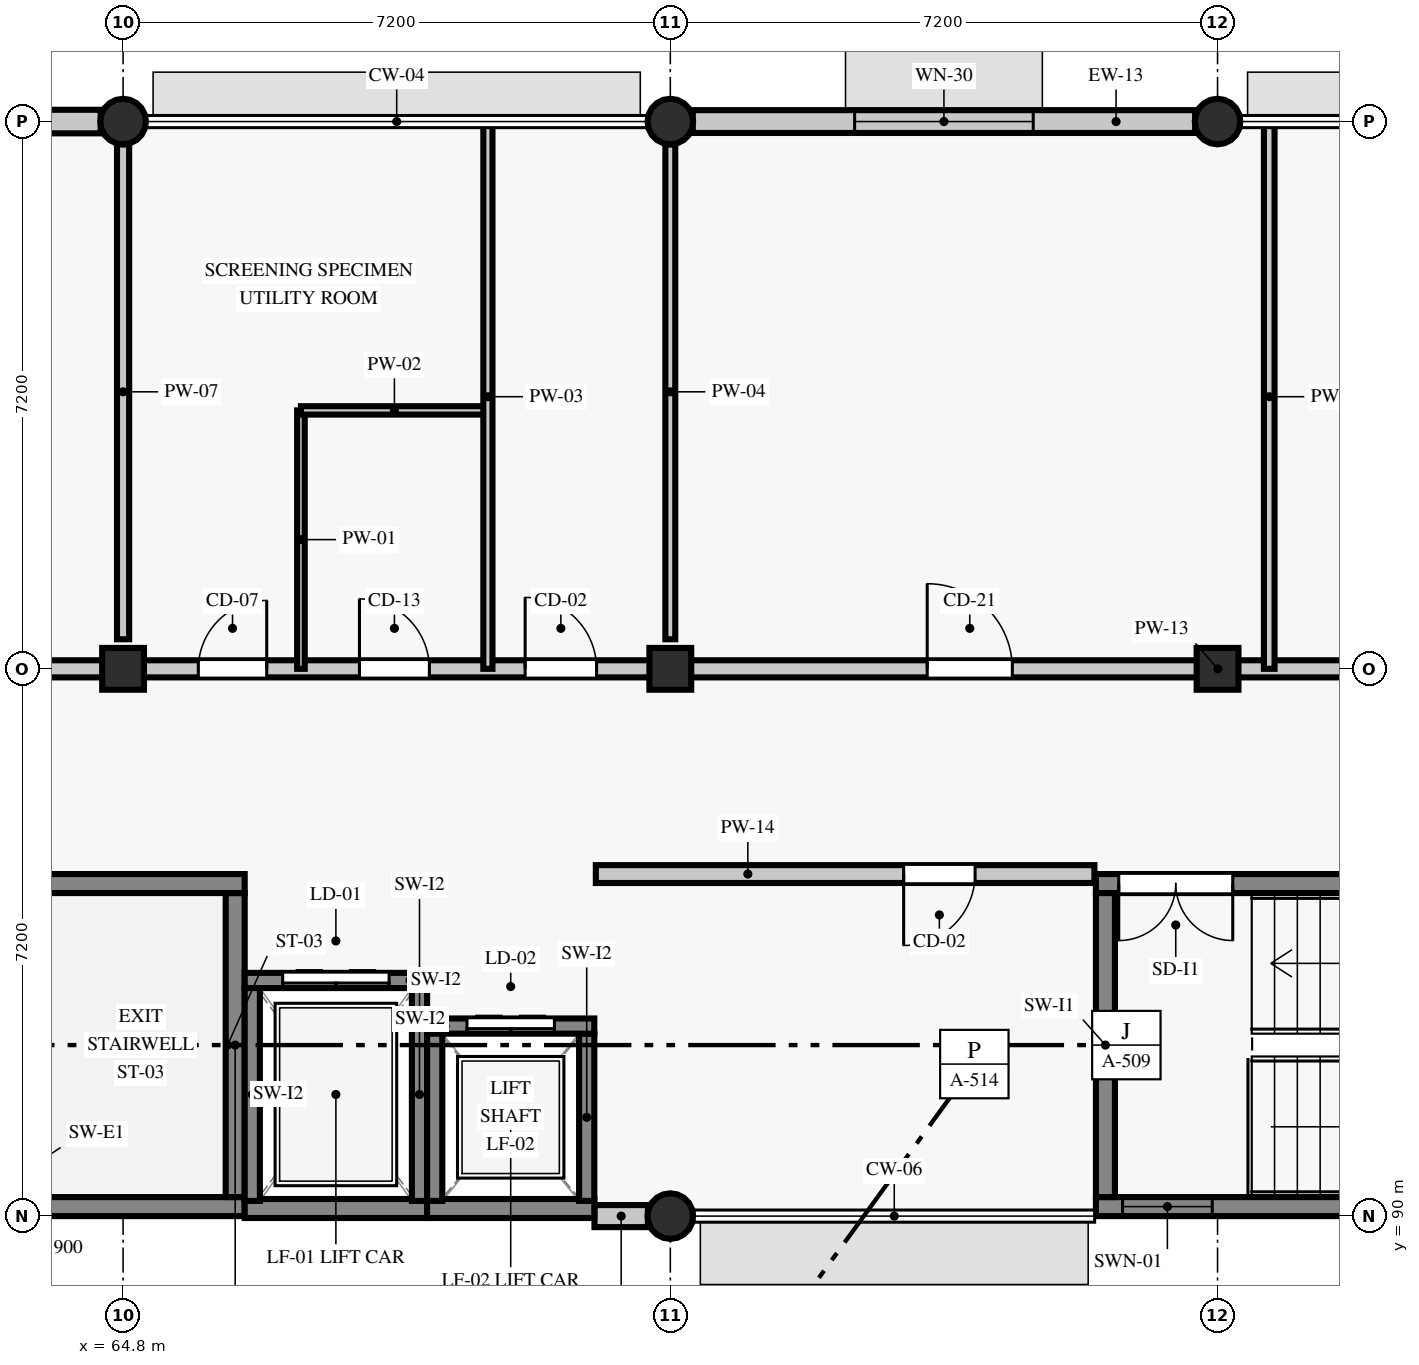
"""IFC4 building model, lengths in metres.
Left out: names, types, materials, properties, quantities, classifications, styles, units other than length and angle.
Written with IfcOpenShell. Run it as: python <this file> out.ifc"""

import sys

from ifc_helpers import new_model, si_unit, direction, frame, frame_2d, origin, origin_2d, place, context, subcontext, project, spatial, rectangle, circle, extrude, element, fill, save


model = new_model("IFC4")
c1 = context("Model", 3, precision=1e-05, world=origin(), true_north=direction((0.0, 1.0)))
c2 = subcontext(c1, "Body", "Model", "MODEL_VIEW")
j1 = project(units=[si_unit("LENGTHUNIT", "METRE"), si_unit("PLANEANGLEUNIT", "RADIAN")], contexts=[c1])
p1 = place(None, origin())
s1 = spatial("IfcSite", under=j1, at=p1, CompositionType="ELEMENT")
p2 = place(p1, origin())
s2 = spatial("IfcBuilding", under=s1, at=p2, CompositionType="ELEMENT")
p3 = place(p2, frame((0.0, 0.0, 18.0)))
s3 = spatial("IfcBuildingStorey", under=s2, at=p3, CompositionType="ELEMENT", Elevation=18.0)
p4 = place(p3, frame((64.8, 97.2, 0.0), z_axis=(0.0, 0.0, 1.0), x_axis=(1.0, 0.0, 0.0)))
e1 = element("IfcColumn", 1, at=p4, inside=s3, PredefinedType="COLUMN", context=c2, shape_type="SweptSolid", body=[
    extrude(rectangle(XDim=0.55, YDim=0.55, at=origin_2d()), origin(), (0.0, 0.0, 1.0), 3.94),
])
for number, where, z_axis, x_axis in (
    (2, (64.8, 104.4, 0.0), (0.0, 0.0, 1.0), (1.0, 0.0, 0.0)),
    (3, (72.0, 90.0, 0.0), (0.0, 0.0, 1.0), (1.0, 0.0, 0.0)),
):
    element("IfcColumn", number, at=place(p3, frame(where, z_axis=z_axis, x_axis=x_axis)), inside=s3, PredefinedType="COLUMN", context=c2, shape_type="SweptSolid", body=[
        extrude(circle(Radius=0.3, at=origin_2d()), origin(), (0.0, 0.0, 1.0), 3.94),
    ])
p5 = place(p3, frame((72.0, 97.2, 0.0), z_axis=(0.0, 0.0, 1.0), x_axis=(1.0, 0.0, 0.0)))
e4 = element("IfcColumn", 4, at=p5, inside=s3, PredefinedType="COLUMN", context=c2, shape_type="SweptSolid", body=[
    extrude(rectangle(XDim=0.55, YDim=0.55, at=origin_2d()), origin(), (0.0, 0.0, 1.0), 3.94),
])
p6 = place(p3, frame((72.0, 104.4, 0.0), z_axis=(0.0, 0.0, 1.0), x_axis=(1.0, 0.0, 0.0)))
e5 = element("IfcColumn", 5, at=p6, inside=s3, PredefinedType="COLUMN", context=c2, shape_type="SweptSolid", body=[
    extrude(circle(Radius=0.3, at=origin_2d()), origin(), (0.0, 0.0, 1.0), 3.94),
])
p7 = place(p3, frame((79.2, 97.2, 0.0), z_axis=(0.0, 0.0, 1.0), x_axis=(1.0, 0.0, 0.0)))
e6 = element("IfcColumn", 6, at=p7, inside=s3, PredefinedType="COLUMN", context=c2, shape_type="SweptSolid", body=[
    extrude(rectangle(XDim=0.55, YDim=0.55, at=origin_2d()), origin(), (0.0, 0.0, 1.0), 3.94),
])
p8 = place(p3, frame((79.2, 104.4, 0.0), z_axis=(0.0, 0.0, 1.0), x_axis=(1.0, 0.0, 0.0)))
e7 = element("IfcColumn", 7, at=p8, inside=s3, PredefinedType="COLUMN", context=c2, shape_type="SweptSolid", body=[
    extrude(circle(Radius=0.3, at=origin_2d()), origin(), (0.0, 0.0, 1.0), 3.94),
])
p9 = place(p3, frame((71.002, 90.0, 0.0), z_axis=(0.0, 0.0, 1.0), x_axis=(1.0, 0.0, 0.0)))
e8 = element("IfcWall", 8, at=p9, inside=s3, PredefinedType="STANDARD", context=c2, shape_type="SweptSolid", body=[
    extrude(rectangle(XDim=0.703, YDim=0.29, at=frame_2d((0.352, 0.0))), origin(), (0.0, 0.0, 1.0), 3.94),
])
p10 = place(p3, frame((78.905, 104.4, 0.0), z_axis=(0.0, 0.0, 1.0), x_axis=(-1.0, 0.0, 0.0)))
e9 = element("IfcWall", 9, at=p10, inside=s3, PredefinedType="STANDARD", context=c2, shape_type="SweptSolid", body=[
    extrude(rectangle(XDim=6.61, YDim=0.3, at=frame_2d((3.305, 0.0))), origin(), (0.0, 0.0, 1.0), 3.29),
])
p11 = place(p10, frame((2.13, 0.0, 0.9)))
e10 = element("IfcOpeningElement", 10, at=p11, cuts=e9, PredefinedType="OPENING", context=c2, shape_type="SweptSolid", body=[
    extrude(rectangle(XDim=2.35, YDim=1.54, at=frame_2d((1.175, 0.77))), frame((0.0, 0.16, 0.0), z_axis=(0.0, -1.0, 0.0), x_axis=(1.0, 0.0, 0.0)), (0.0, 0.0, 1.0), 0.32),
])
p12 = place(p3, frame((64.505, 104.4, 0.0), z_axis=(0.0, 0.0, 1.0), x_axis=(-1.0, 0.0, 0.0)))
e11 = element("IfcWall", 11, at=p12, inside=s3, PredefinedType="STANDARD", context=c2, shape_type="SweptSolid", body=[
    extrude(rectangle(XDim=6.61, YDim=0.31, at=frame_2d((3.305, 0.0))), origin(), (0.0, 0.0, 1.0), 3.29),
])
p13 = place(p12, frame((2.705, 0.0, 0.9)))
e12 = element("IfcOpeningElement", 12, at=p13, cuts=e11, PredefinedType="OPENING", context=c2, shape_type="SweptSolid", body=[
    extrude(rectangle(XDim=1.2, YDim=1.66, at=frame_2d((0.6, 0.83))), frame((0.0, 0.165, 0.0), z_axis=(0.0, -1.0, 0.0), x_axis=(1.0, 0.0, 0.0)), (0.0, 0.0, 1.0), 0.33),
])
p14 = place(p3, frame((57.6, 90.125, 0.0), z_axis=(0.0, 0.0, 1.0), x_axis=(1.0, 0.0, 0.0)))
e13 = element("IfcWall", 13, at=p14, inside=s3, PredefinedType="SHEAR", context=c2, shape_type="SweptSolid", body=[
    extrude(rectangle(XDim=8.8, YDim=0.25, at=frame_2d((4.4, 0.0))), origin(), (0.0, 0.0, 1.0), 3.94),
])
p15 = place(p14, frame((0.35, 0.0, 0.92)))
e14 = element("IfcOpeningElement", 14, at=p15, cuts=e13, PredefinedType="OPENING", context=c2, shape_type="SweptSolid", body=[
    extrude(rectangle(XDim=1.18, YDim=1.48, at=frame_2d((0.59, 0.74))), frame((0.0, 0.135, 0.0), z_axis=(0.0, -1.0, 0.0), x_axis=(1.0, 0.0, 0.0)), (0.0, 0.0, 1.0), 0.27),
])
p16 = place(p3, frame((66.275, 90.25, 0.0), z_axis=(0.0, 0.0, 1.0), x_axis=(0.0, 1.0, 0.0)))
e15 = element("IfcWall", 15, at=p16, inside=s3, PredefinedType="SHEAR", context=c2, shape_type="SweptSolid", body=[
    extrude(rectangle(XDim=4.0, YDim=0.25, at=frame_2d((2.0, 0.0))), origin(), (0.0, 0.0, 1.0), 3.94),
])
p17 = place(p3, frame((66.4, 94.375, 0.0), z_axis=(0.0, 0.0, 1.0), x_axis=(-1.0, 0.0, 0.0)))
e16 = element("IfcWall", 16, at=p17, inside=s3, PredefinedType="SHEAR", context=c2, shape_type="SweptSolid", body=[
    extrude(rectangle(XDim=8.8, YDim=0.25, at=frame_2d((4.4, 0.0))), origin(), (0.0, 0.0, 1.0), 3.94),
])
p18 = place(p17, frame((7.0, 0.0, 0.0)))
e17 = element("IfcOpeningElement", 17, at=p18, cuts=e16, PredefinedType="OPENING", context=c2, shape_type="SweptSolid", body=[
    extrude(rectangle(XDim=1.5, YDim=2.15, at=frame_2d((0.75, 1.075))), frame((0.0, 0.135, 0.0), z_axis=(0.0, -1.0, 0.0), x_axis=(1.0, 0.0, 0.0)), (0.0, 0.0, 1.0), 0.27),
])
p19 = place(p3, frame((77.6, 90.125, 0.0), z_axis=(0.0, 0.0, 1.0), x_axis=(1.0, 0.0, 0.0)))
e18 = element("IfcWall", 18, at=p19, inside=s3, PredefinedType="SHEAR", context=c2, shape_type="SweptSolid", body=[
    extrude(rectangle(XDim=8.8, YDim=0.25, at=frame_2d((4.4, 0.0))), origin(), (0.0, 0.0, 1.0), 3.94),
])
p20 = place(p19, frame((0.35, 0.0, 0.92)))
e19 = element("IfcOpeningElement", 19, at=p20, cuts=e18, PredefinedType="OPENING", context=c2, shape_type="SweptSolid", body=[
    extrude(rectangle(XDim=1.18, YDim=1.48, at=frame_2d((0.59, 0.74))), frame((0.0, 0.135, 0.0), z_axis=(0.0, -1.0, 0.0), x_axis=(1.0, 0.0, 0.0)), (0.0, 0.0, 1.0), 0.27),
])
p21 = place(p3, frame((86.4, 94.375, 0.0), z_axis=(0.0, 0.0, 1.0), x_axis=(-1.0, 0.0, 0.0)))
e20 = element("IfcWall", 20, at=p21, inside=s3, PredefinedType="SHEAR", context=c2, shape_type="SweptSolid", body=[
    extrude(rectangle(XDim=8.8, YDim=0.25, at=frame_2d((4.4, 0.0))), origin(), (0.0, 0.0, 1.0), 3.94),
])
p22 = place(p21, frame((7.0, 0.0, 0.0)))
e21 = element("IfcOpeningElement", 21, at=p22, cuts=e20, PredefinedType="OPENING", context=c2, shape_type="SweptSolid", body=[
    extrude(rectangle(XDim=1.5, YDim=2.15, at=frame_2d((0.75, 1.075))), frame((0.0, 0.135, 0.0), z_axis=(0.0, -1.0, 0.0), x_axis=(1.0, 0.0, 0.0)), (0.0, 0.0, 1.0), 0.27),
])
p23 = place(p3, frame((77.725, 94.25, 0.0), z_axis=(0.0, 0.0, 1.0), x_axis=(0.0, -1.0, 0.0)))
e22 = element("IfcWall", 22, at=p23, inside=s3, PredefinedType="SHEAR", context=c2, shape_type="SweptSolid", body=[
    extrude(rectangle(XDim=4.0, YDim=0.25, at=frame_2d((2.0, 0.0))), origin(), (0.0, 0.0, 1.0), 3.94),
])
p24 = place(p3, frame((66.4, 90.1, 0.0), z_axis=(0.0, 0.0, 1.0), x_axis=(1.0, 0.0, 0.0)))
e23 = element("IfcWall", 23, at=p24, inside=s3, PredefinedType="SHEAR", context=c2, shape_type="SweptSolid", body=[
    extrude(rectangle(XDim=2.4, YDim=0.25, at=frame_2d((1.2, 0.0))), origin(), (0.0, 0.0, 1.0), 3.94),
])
p25 = place(p3, frame((68.7, 90.2, 0.0), z_axis=(0.0, 0.0, 1.0), x_axis=(0.0, 1.0, 0.0)))
e24 = element("IfcWall", 24, at=p25, inside=s3, PredefinedType="SHEAR", context=c2, shape_type="SweptSolid", body=[
    extrude(rectangle(XDim=2.8, YDim=0.2, at=frame_2d((1.4, 0.0))), origin(), (0.0, 0.0, 1.0), 3.94),
])
p26 = place(p3, frame((68.8, 93.1, 0.0), z_axis=(0.0, 0.0, 1.0), x_axis=(-1.0, 0.0, 0.0)))
e25 = element("IfcWall", 25, at=p26, inside=s3, PredefinedType="SHEAR", context=c2, shape_type="SweptSolid", body=[
    extrude(rectangle(XDim=2.4, YDim=0.2, at=frame_2d((1.2, 0.0))), origin(), (0.0, 0.0, 1.0), 3.94),
])
p27 = place(p26, frame((0.5, 0.0, 0.0)))
e26 = element("IfcOpeningElement", 26, at=p27, cuts=e25, PredefinedType="OPENING", context=c2, shape_type="SweptSolid", body=[
    extrude(rectangle(XDim=1.4, YDim=2.15, at=frame_2d((0.7, 1.075))), frame((0.0, 0.11, 0.0), z_axis=(0.0, -1.0, 0.0), x_axis=(1.0, 0.0, 0.0)), (0.0, 0.0, 1.0), 0.22),
])
p28 = place(p3, frame((66.5, 93.0, 0.0), z_axis=(0.0, 0.0, 1.0), x_axis=(0.0, -1.0, 0.0)))
e27 = element("IfcWall", 27, at=p28, inside=s3, PredefinedType="SHEAR", context=c2, shape_type="SweptSolid", body=[
    extrude(rectangle(XDim=2.8, YDim=0.2, at=frame_2d((1.4, 0.0))), origin(), (0.0, 0.0, 1.0), 3.94),
])
p29 = place(p3, frame((68.8, 90.1, 0.0), z_axis=(0.0, 0.0, 1.0), x_axis=(1.0, 0.0, 0.0)))
e28 = element("IfcWall", 28, at=p29, inside=s3, PredefinedType="SHEAR", context=c2, shape_type="SweptSolid", body=[
    extrude(rectangle(XDim=2.2, YDim=0.25, at=frame_2d((1.1, 0.0))), origin(), (0.0, 0.0, 1.0), 3.94),
])
p30 = place(p3, frame((70.9, 90.2, 0.0), z_axis=(0.0, 0.0, 1.0), x_axis=(0.0, 1.0, 0.0)))
e29 = element("IfcWall", 29, at=p30, inside=s3, PredefinedType="SHEAR", context=c2, shape_type="SweptSolid", body=[
    extrude(rectangle(XDim=2.2, YDim=0.2, at=frame_2d((1.1, 0.0))), origin(), (0.0, 0.0, 1.0), 3.94),
])
p31 = place(p3, frame((71.0, 92.5, 0.0), z_axis=(0.0, 0.0, 1.0), x_axis=(-1.0, 0.0, 0.0)))
e30 = element("IfcWall", 30, at=p31, inside=s3, PredefinedType="SHEAR", context=c2, shape_type="SweptSolid", body=[
    extrude(rectangle(XDim=2.2, YDim=0.2, at=frame_2d((1.1, 0.0))), origin(), (0.0, 0.0, 1.0), 3.94),
])
p32 = place(p31, frame((0.525, 0.0, 0.0)))
e31 = element("IfcOpeningElement", 31, at=p32, cuts=e30, PredefinedType="OPENING", context=c2, shape_type="SweptSolid", body=[
    extrude(rectangle(XDim=1.15, YDim=2.15, at=frame_2d((0.575, 1.075))), frame((0.0, 0.11, 0.0), z_axis=(0.0, -1.0, 0.0), x_axis=(1.0, 0.0, 0.0)), (0.0, 0.0, 1.0), 0.22),
])
p33 = place(p3, frame((68.9, 92.4, 0.0), z_axis=(0.0, 0.0, 1.0), x_axis=(0.0, -1.0, 0.0)))
e32 = element("IfcWall", 32, at=p33, inside=s3, PredefinedType="SHEAR", context=c2, shape_type="SweptSolid", body=[
    extrude(rectangle(XDim=2.2, YDim=0.2, at=frame_2d((1.1, 0.0))), origin(), (0.0, 0.0, 1.0), 3.94),
])
p34 = place(p3, frame((57.9, 97.2, 0.0), z_axis=(0.0, 0.0, 1.0), x_axis=(1.0, 0.0, 0.0)))
e33 = element("IfcWall", 33, at=p34, inside=s3, PredefinedType="PARTITIONING", context=c2, shape_type="SweptSolid", body=[
    extrude(rectangle(XDim=28.2, YDim=0.225, at=frame_2d((14.1, 0.0))), origin(), (0.0, 0.0, 1.0), 3.19),
])
p35 = place(p34, frame((2.778, 0.0, 0.0)))
e34 = element("IfcOpeningElement", 34, at=p35, cuts=e33, PredefinedType="OPENING", context=c2, shape_type="SweptSolid", body=[
    extrude(rectangle(XDim=1.13, YDim=2.18, at=frame_2d((0.565, 1.09))), frame((0.0, 0.123, 0.0), z_axis=(0.0, -1.0, 0.0), x_axis=(1.0, 0.0, 0.0)), (0.0, 0.0, 1.0), 0.245),
])
p36 = place(p34, frame((7.89, 0.0, 0.0)))
e35 = element("IfcOpeningElement", 35, at=p36, cuts=e33, PredefinedType="OPENING", context=c2, shape_type="SweptSolid", body=[
    extrude(rectangle(XDim=0.9, YDim=2.13, at=frame_2d((0.45, 1.065))), frame((0.0, 0.123, 0.0), z_axis=(0.0, -1.0, 0.0), x_axis=(1.0, 0.0, 0.0)), (0.0, 0.0, 1.0), 0.245),
])
p37 = place(p34, frame((10.01, 0.0, 0.0)))
e36 = element("IfcOpeningElement", 36, at=p37, cuts=e33, PredefinedType="OPENING", context=c2, shape_type="SweptSolid", body=[
    extrude(rectangle(XDim=0.92, YDim=2.18, at=frame_2d((0.46, 1.09))), frame((0.0, 0.123, 0.0), z_axis=(0.0, -1.0, 0.0), x_axis=(1.0, 0.0, 0.0)), (0.0, 0.0, 1.0), 0.245),
])
p38 = place(p34, frame((12.19, 0.0, 0.0)))
e37 = element("IfcOpeningElement", 37, at=p38, cuts=e33, PredefinedType="OPENING", context=c2, shape_type="SweptSolid", body=[
    extrude(rectangle(XDim=0.94, YDim=2.08, at=frame_2d((0.47, 1.04))), frame((0.0, 0.123, 0.0), z_axis=(0.0, -1.0, 0.0), x_axis=(1.0, 0.0, 0.0)), (0.0, 0.0, 1.0), 0.245),
])
p39 = place(p34, frame((17.48, 0.0, 0.0)))
e38 = element("IfcOpeningElement", 38, at=p39, cuts=e33, PredefinedType="OPENING", context=c2, shape_type="SweptSolid", body=[
    extrude(rectangle(XDim=1.12, YDim=2.23, at=frame_2d((0.56, 1.115))), frame((0.0, 0.123, 0.0), z_axis=(0.0, -1.0, 0.0), x_axis=(1.0, 0.0, 0.0)), (0.0, 0.0, 1.0), 0.245),
])
p40 = place(p34, frame((24.009, 0.0, 0.0)))
e39 = element("IfcOpeningElement", 39, at=p40, cuts=e33, PredefinedType="OPENING", context=c2, shape_type="SweptSolid", body=[
    extrude(rectangle(XDim=1.2, YDim=2.23, at=frame_2d((0.6, 1.115))), frame((0.0, 0.123, 0.0), z_axis=(0.0, -1.0, 0.0), x_axis=(1.0, 0.0, 0.0)), (0.0, 0.0, 1.0), 0.245),
])
p41 = place(p3, frame((64.8, 97.589, 0.0), z_axis=(0.0, 0.0, 1.0), x_axis=(0.0, 1.0, 0.0)))
e40 = element("IfcWall", 40, at=p41, inside=s3, PredefinedType="PARTITIONING", context=c2, shape_type="SweptSolid", body=[
    extrude(rectangle(XDim=6.511, YDim=0.16, at=frame_2d((3.256, 0.0))), origin(), (0.0, 0.0, 1.0), 3.39),
])
p42 = place(p3, frame((67.14, 97.2, 0.0), z_axis=(0.0, 0.0, 1.0), x_axis=(0.0, 1.0, 0.0)))
e41 = element("IfcWall", 41, at=p42, inside=s3, PredefinedType="PARTITIONING", context=c2, shape_type="SweptSolid", body=[
    extrude(rectangle(XDim=3.4, YDim=0.1, at=frame_2d((1.7, 0.0))), origin(), (0.0, 0.0, 1.0), 3.19),
])
p43 = place(p3, frame((67.14, 100.6, 0.0), z_axis=(0.0, 0.0, 1.0), x_axis=(1.0, 0.0, 0.0)))
e42 = element("IfcWall", 42, at=p43, inside=s3, PredefinedType="PARTITIONING", context=c2, shape_type="SweptSolid", body=[
    extrude(rectangle(XDim=2.46, YDim=0.11, at=frame_2d((1.23, 0.0))), origin(), (0.0, 0.0, 1.0), 3.94),
])
p44 = place(p3, frame((69.6, 97.2, 0.0), z_axis=(0.0, 0.0, 1.0), x_axis=(0.0, 1.0, 0.0)))
e43 = element("IfcWall", 43, at=p44, inside=s3, PredefinedType="PARTITIONING", context=c2, shape_type="SweptSolid", body=[
    extrude(rectangle(XDim=7.16, YDim=0.12, at=frame_2d((3.58, 0.0))), origin(), (0.0, 0.0, 1.0), 3.19),
])
p45 = place(p3, frame((72.0, 97.589, 0.0), z_axis=(0.0, 0.0, 1.0), x_axis=(0.0, 1.0, 0.0)))
e44 = element("IfcWall", 44, at=p45, inside=s3, PredefinedType="PARTITIONING", context=c2, shape_type="SweptSolid", body=[
    extrude(rectangle(XDim=6.511, YDim=0.13, at=frame_2d((3.256, 0.0))), origin(), (0.0, 0.0, 1.0), 3.39),
])
p46 = place(p3, frame((79.88, 97.2, 0.0), z_axis=(0.0, 0.0, 1.0), x_axis=(0.0, 1.0, 0.0)))
e45 = element("IfcWall", 45, at=p46, inside=s3, PredefinedType="PARTITIONING", context=c2, shape_type="SweptSolid", body=[
    extrude(rectangle(XDim=7.16, YDim=0.14, at=frame_2d((3.58, 0.0))), origin(), (0.0, 0.0, 1.0), 3.19),
])
p47 = place(p3, frame((71.02, 94.5, 0.0), z_axis=(0.0, 0.0, 1.0), x_axis=(1.0, 0.0, 0.0)))
e46 = element("IfcWall", 46, at=p47, inside=s3, PredefinedType="PARTITIONING", context=c2, shape_type="SweptSolid", body=[
    extrude(rectangle(XDim=6.56, YDim=0.235, at=frame_2d((3.28, 0.0))), origin(), (0.0, 0.0, 1.0), 3.39),
])
p48 = place(p47, frame((4.05, 0.0, 0.0)))
e47 = element("IfcOpeningElement", 47, at=p48, cuts=e46, PredefinedType="OPENING", context=c2, shape_type="SweptSolid", body=[
    extrude(rectangle(XDim=0.94, YDim=2.08, at=frame_2d((0.47, 1.04))), frame((0.0, 0.127, 0.0), z_axis=(0.0, -1.0, 0.0), x_axis=(1.0, 0.0, 0.0)), (0.0, 0.0, 1.0), 0.255),
])
p49 = place(p11, origin())
e48 = element("IfcWindow", 48, at=p49, inside=s3, PartitioningType="SINGLE_PANEL", PredefinedType="WINDOW", context=c2, shape_type="SweptSolid", body=[
    extrude(rectangle(XDim=2.35, YDim=1.54, at=frame_2d((1.175, 0.77))), frame((0.0, 0.03, 0.0), z_axis=(0.0, -1.0, 0.0), x_axis=(1.0, 0.0, 0.0)), (0.0, 0.0, 1.0), 0.06),
])
fill(e10, e48)
p50 = place(p20, origin())
e49 = element("IfcWindow", 49, at=p50, inside=s3, PartitioningType="SINGLE_PANEL", PredefinedType="WINDOW", context=c2, shape_type="SweptSolid", body=[
    extrude(rectangle(XDim=1.18, YDim=1.48, at=frame_2d((0.59, 0.74))), frame((0.0, 0.03, 0.0), z_axis=(0.0, -1.0, 0.0), x_axis=(1.0, 0.0, 0.0)), (0.0, 0.0, 1.0), 0.06),
])
fill(e19, e49)
p51 = place(p22, origin())
e50 = element("IfcDoor", 50, at=p51, inside=s3, OperationType="DOUBLE_DOOR_SINGLE_SWING", PredefinedType="DOOR", context=c2, shape_type="SweptSolid", body=[
    extrude(rectangle(XDim=1.5, YDim=2.15, at=frame_2d((0.75, 1.075))), frame((0.0, 0.025, 0.0), z_axis=(0.0, -1.0, 0.0), x_axis=(1.0, 0.0, 0.0)), (0.0, 0.0, 1.0), 0.05),
])
fill(e21, e50)
p52 = place(p27, frame((1.4, 0.0, 0.0), z_axis=(0.0, 0.0, 1.0), x_axis=(-1.0, 0.0, 0.0)))
e51 = element("IfcDoor", 51, at=p52, inside=s3, OperationType="DOUBLE_DOOR_SLIDING", PredefinedType="DOOR", context=c2, shape_type="SweptSolid", body=[
    extrude(rectangle(XDim=1.4, YDim=2.15, at=frame_2d((0.7, 1.075))), frame((0.0, 0.025, 0.0), z_axis=(0.0, -1.0, 0.0), x_axis=(1.0, 0.0, 0.0)), (0.0, 0.0, 1.0), 0.05),
])
fill(e26, e51)
p53 = place(p32, frame((1.15, 0.0, 0.0), z_axis=(0.0, 0.0, 1.0), x_axis=(-1.0, 0.0, 0.0)))
e52 = element("IfcDoor", 52, at=p53, inside=s3, OperationType="DOUBLE_DOOR_SLIDING", PredefinedType="DOOR", context=c2, shape_type="SweptSolid", body=[
    extrude(rectangle(XDim=1.15, YDim=2.15, at=frame_2d((0.575, 1.075))), frame((0.0, 0.025, 0.0), z_axis=(0.0, -1.0, 0.0), x_axis=(1.0, 0.0, 0.0)), (0.0, 0.0, 1.0), 0.05),
])
fill(e31, e52)
p54 = place(p36, origin())
e53 = element("IfcDoor", 53, at=p54, inside=s3, OperationType="SINGLE_SWING_RIGHT", PredefinedType="DOOR", context=c2, shape_type="SweptSolid", body=[
    extrude(rectangle(XDim=0.9, YDim=2.13, at=frame_2d((0.45, 1.065))), frame((0.0, 0.025, 0.0), z_axis=(0.0, -1.0, 0.0), x_axis=(1.0, 0.0, 0.0)), (0.0, 0.0, 1.0), 0.05),
])
fill(e35, e53)
p55 = place(p37, origin())
e54 = element("IfcDoor", 54, at=p55, inside=s3, OperationType="SINGLE_SWING_LEFT", PredefinedType="DOOR", context=c2, shape_type="SweptSolid", body=[
    extrude(rectangle(XDim=0.92, YDim=2.18, at=frame_2d((0.46, 1.09))), frame((0.0, 0.025, 0.0), z_axis=(0.0, -1.0, 0.0), x_axis=(1.0, 0.0, 0.0)), (0.0, 0.0, 1.0), 0.05),
])
fill(e36, e54)
p56 = place(p38, origin())
e55 = element("IfcDoor", 55, at=p56, inside=s3, OperationType="SINGLE_SWING_LEFT", PredefinedType="DOOR", context=c2, shape_type="SweptSolid", body=[
    extrude(rectangle(XDim=0.94, YDim=2.08, at=frame_2d((0.47, 1.04))), frame((0.0, 0.025, 0.0), z_axis=(0.0, -1.0, 0.0), x_axis=(1.0, 0.0, 0.0)), (0.0, 0.0, 1.0), 0.05),
])
fill(e37, e55)
p57 = place(p39, origin())
e56 = element("IfcDoor", 56, at=p57, inside=s3, OperationType="SINGLE_SWING_LEFT", PredefinedType="DOOR", context=c2, shape_type="SweptSolid", body=[
    extrude(rectangle(XDim=1.12, YDim=2.23, at=frame_2d((0.56, 1.115))), frame((0.0, 0.025, 0.0), z_axis=(0.0, -1.0, 0.0), x_axis=(1.0, 0.0, 0.0)), (0.0, 0.0, 1.0), 0.05),
])
fill(e38, e56)
p58 = place(p48, frame((0.94, 0.0, 0.0), z_axis=(0.0, 0.0, 1.0), x_axis=(-1.0, 0.0, 0.0)))
e57 = element("IfcDoor", 57, at=p58, inside=s3, OperationType="SINGLE_SWING_RIGHT", PredefinedType="DOOR", context=c2, shape_type="SweptSolid", body=[
    extrude(rectangle(XDim=0.94, YDim=2.08, at=frame_2d((0.47, 1.04))), frame((0.0, 0.025, 0.0), z_axis=(0.0, -1.0, 0.0), x_axis=(1.0, 0.0, 0.0)), (0.0, 0.0, 1.0), 0.05),
])
fill(e47, e57)
save(model, sys.argv[1])
